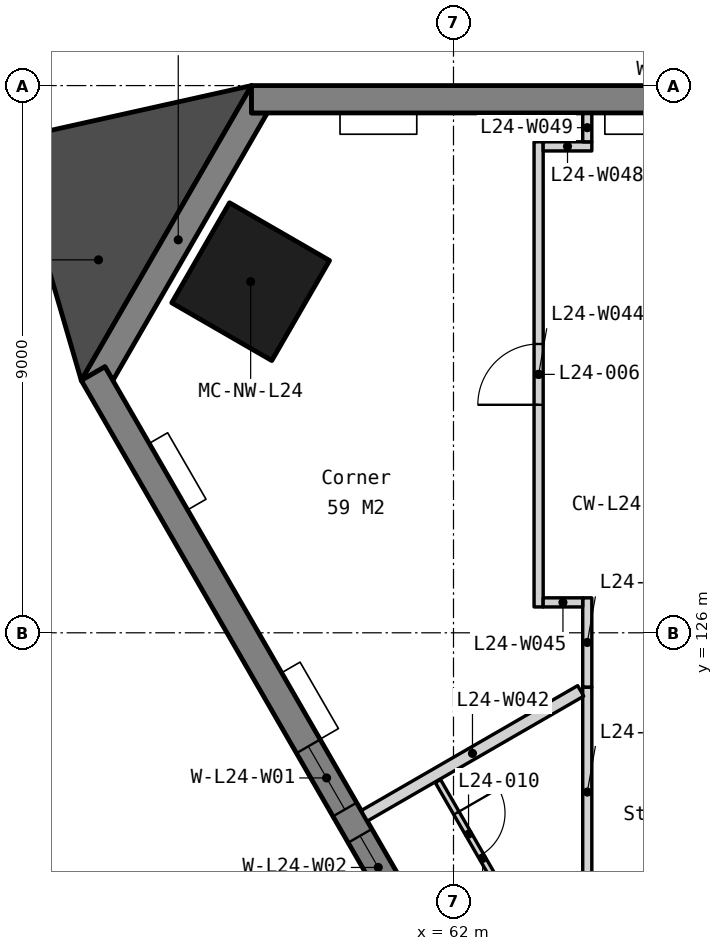
"""IFC4 building model, lengths in metres.
Left out: names, types, materials, properties, quantities, classifications, styles, units other than length and angle.
Written with IfcOpenShell. Run it as: python <this file> out.ifc"""

import sys

from ifc_helpers import new_model, si_unit, direction, frame, frame_2d, origin, origin_2d, place, context, subcontext, project, spatial, polyline, rectangle, outline, extrude, element, fill, save


model = new_model("IFC4")
c1 = context("Model", 3, precision=1e-05, world=origin(), true_north=direction((0.0, 1.0)))
c2 = subcontext(c1, "Body", "Model", "MODEL_VIEW")
j1 = project(units=[si_unit("LENGTHUNIT", "METRE"), si_unit("PLANEANGLEUNIT", "RADIAN")], contexts=[c1])
p1 = place(None, origin())
s1 = spatial("IfcSite", under=j1, at=p1, CompositionType="ELEMENT")
p2 = place(p1, origin())
s2 = spatial("IfcBuilding", under=s1, at=p2, CompositionType="ELEMENT")
p3 = place(p2, frame((0.0, 0.0, 99.3)))
s3 = spatial("IfcBuildingStorey", under=s2, at=p3, CompositionType="ELEMENT", Elevation=99.3)
p4 = place(p3, frame((58.664, 131.775, 0.0), z_axis=(0.0, 0.0, 1.0), x_axis=(-0.5, -0.866025403784, 0.0)))
e1 = element("IfcColumn", 1, at=p4, inside=s3, PredefinedType="COLUMN", context=c2, shape_type="SweptSolid", body=[
    extrude(rectangle(XDim=1.9, YDim=1.9, at=origin_2d()), origin(), (0.0, 0.0, 1.0), 3.5),
])
p5 = place(p3, frame((0.0, 0.0, -0.15)))
e2 = element("IfcWall", 2, at=p5, inside=s3, PredefinedType="SOLIDWALL", context=c2, shape_type="SweptSolid", body=[
    extrude(outline(polyline([(58.678, 135.0), (58.678, 134.55), (58.938, 134.55), (56.398, 130.15), (56.268, 130.375), (55.878, 130.15), (58.678, 135.0)])), origin(), (0.0, 0.0, 1.0), 3.5),
])
p6 = place(p3, frame((101.322, 134.775, -0.15), z_axis=(0.0, 0.0, 1.0), x_axis=(-1.0, 0.0, 0.0)))
e3 = element("IfcWall", 3, at=p6, inside=s3, PredefinedType="SOLIDWALL", context=c2, shape_type="SweptSolid", body=[
    extrude(outline(polyline([(42.643, 0.0), (42.643, 3.5), (0.0, 3.5), (0.0, 0.0), (42.643, 0.0)])), frame((0.0, 0.225, 0.0), z_axis=(0.0, -1.0, 0.0), x_axis=(1.0, 0.0, 0.0)), (0.0, 0.0, 1.0), 0.45),
])
p7 = place(p6, frame((7.079, 0.0, 1.05)))
e4 = element("IfcOpeningElement", 4, at=p7, cuts=e3, PredefinedType="OPENING", context=c2, shape_type="SweptSolid", body=[
    extrude(rectangle(XDim=1.2, YDim=1.5, at=frame_2d((0.6, 0.75))), frame((0.0, 0.235, 0.0), z_axis=(0.0, -1.0, 0.0), x_axis=(1.0, 0.0, 0.0)), (0.0, 0.0, 1.0), 0.47),
])
p8 = place(p6, frame((8.779, 0.0, 1.05)))
e5 = element("IfcOpeningElement", 5, at=p8, cuts=e3, PredefinedType="OPENING", context=c2, shape_type="SweptSolid", body=[
    extrude(rectangle(XDim=1.2, YDim=1.5, at=frame_2d((0.6, 0.75))), frame((0.0, 0.235, 0.0), z_axis=(0.0, -1.0, 0.0), x_axis=(1.0, 0.0, 0.0)), (0.0, 0.0, 1.0), 0.47),
])
p9 = place(p6, frame((15.607, 0.0, 1.05)))
e6 = element("IfcOpeningElement", 6, at=p9, cuts=e3, PredefinedType="OPENING", context=c2, shape_type="SweptSolid", body=[
    extrude(rectangle(XDim=1.2, YDim=1.5, at=frame_2d((0.6, 0.75))), frame((0.0, 0.235, 0.0), z_axis=(0.0, -1.0, 0.0), x_axis=(1.0, 0.0, 0.0)), (0.0, 0.0, 1.0), 0.47),
])
p10 = place(p6, frame((17.307, 0.0, 1.05)))
e7 = element("IfcOpeningElement", 7, at=p10, cuts=e3, PredefinedType="OPENING", context=c2, shape_type="SweptSolid", body=[
    extrude(rectangle(XDim=1.2, YDim=1.5, at=frame_2d((0.6, 0.75))), frame((0.0, 0.235, 0.0), z_axis=(0.0, -1.0, 0.0), x_axis=(1.0, 0.0, 0.0)), (0.0, 0.0, 1.0), 0.47),
])
p11 = place(p6, frame((24.136, 0.0, 1.05)))
e8 = element("IfcOpeningElement", 8, at=p11, cuts=e3, PredefinedType="OPENING", context=c2, shape_type="SweptSolid", body=[
    extrude(rectangle(XDim=1.2, YDim=1.5, at=frame_2d((0.6, 0.75))), frame((0.0, 0.235, 0.0), z_axis=(0.0, -1.0, 0.0), x_axis=(1.0, 0.0, 0.0)), (0.0, 0.0, 1.0), 0.47),
])
p12 = place(p6, frame((25.836, 0.0, 1.05)))
e9 = element("IfcOpeningElement", 9, at=p12, cuts=e3, PredefinedType="OPENING", context=c2, shape_type="SweptSolid", body=[
    extrude(rectangle(XDim=1.2, YDim=1.5, at=frame_2d((0.6, 0.75))), frame((0.0, 0.235, 0.0), z_axis=(0.0, -1.0, 0.0), x_axis=(1.0, 0.0, 0.0)), (0.0, 0.0, 1.0), 0.47),
])
p13 = place(p6, frame((32.665, 0.0, 1.05)))
e10 = element("IfcOpeningElement", 10, at=p13, cuts=e3, PredefinedType="OPENING", context=c2, shape_type="SweptSolid", body=[
    extrude(rectangle(XDim=1.2, YDim=1.5, at=frame_2d((0.6, 0.75))), frame((0.0, 0.235, 0.0), z_axis=(0.0, -1.0, 0.0), x_axis=(1.0, 0.0, 0.0)), (0.0, 0.0, 1.0), 0.47),
])
p14 = place(p6, frame((34.365, 0.0, 1.05)))
e11 = element("IfcOpeningElement", 11, at=p14, cuts=e3, PredefinedType="OPENING", context=c2, shape_type="SweptSolid", body=[
    extrude(rectangle(XDim=1.2, YDim=1.5, at=frame_2d((0.6, 0.75))), frame((0.0, 0.235, 0.0), z_axis=(0.0, -1.0, 0.0), x_axis=(1.0, 0.0, 0.0)), (0.0, 0.0, 1.0), 0.47),
])
p15 = place(p3, frame((56.073, 130.263, -0.15), z_axis=(0.0, 0.0, 1.0), x_axis=(0.500002343971, -0.866024050488, 0.0)))
e12 = element("IfcWall", 12, at=p15, inside=s3, PredefinedType="SOLIDWALL", context=c2, shape_type="SweptSolid", body=[
    extrude(outline(polyline([(0.0, 0.0), (0.0, 3.5), (23.986, 3.5), (23.986, 0.0), (0.0, 0.0)])), frame((0.0, 0.225, 0.0), z_axis=(0.0, -1.0, 0.0), x_axis=(1.0, 0.0, 0.0)), (0.0, 0.0, 1.0), 0.45),
])
p16 = place(p15, frame((7.079, 0.0, 1.05)))
e13 = element("IfcOpeningElement", 13, at=p16, cuts=e12, PredefinedType="OPENING", context=c2, shape_type="SweptSolid", body=[
    extrude(rectangle(XDim=1.2, YDim=1.5, at=frame_2d((0.6, 0.75))), frame((0.0, 0.235, 0.0), z_axis=(0.0, -1.0, 0.0), x_axis=(1.0, 0.0, 0.0)), (0.0, 0.0, 1.0), 0.47),
])
p17 = place(p15, frame((8.779, 0.0, 1.05)))
e14 = element("IfcOpeningElement", 14, at=p17, cuts=e12, PredefinedType="OPENING", context=c2, shape_type="SweptSolid", body=[
    extrude(rectangle(XDim=1.2, YDim=1.5, at=frame_2d((0.6, 0.75))), frame((0.0, 0.235, 0.0), z_axis=(0.0, -1.0, 0.0), x_axis=(1.0, 0.0, 0.0)), (0.0, 0.0, 1.0), 0.47),
])
p18 = place(p15, frame((15.607, 0.0, 1.05)))
e15 = element("IfcOpeningElement", 15, at=p18, cuts=e12, PredefinedType="OPENING", context=c2, shape_type="SweptSolid", body=[
    extrude(rectangle(XDim=1.2, YDim=1.5, at=frame_2d((0.6, 0.75))), frame((0.0, 0.235, 0.0), z_axis=(0.0, -1.0, 0.0), x_axis=(1.0, 0.0, 0.0)), (0.0, 0.0, 1.0), 0.47),
])
p19 = place(p15, frame((17.307, 0.0, 1.05)))
e16 = element("IfcOpeningElement", 16, at=p19, cuts=e12, PredefinedType="OPENING", context=c2, shape_type="SweptSolid", body=[
    extrude(rectangle(XDim=1.2, YDim=1.5, at=frame_2d((0.6, 0.75))), frame((0.0, 0.235, 0.0), z_axis=(0.0, -1.0, 0.0), x_axis=(1.0, 0.0, 0.0)), (0.0, 0.0, 1.0), 0.47),
])
p20 = place(p3, frame((0.0, 0.0, -0.15)))
e17 = element("IfcWall", 17, at=p20, inside=s3, PredefinedType="SOLIDWALL", context=c2, shape_type="SweptSolid", body=[
    extrude(outline(polyline([(58.678, 135.0), (54.721, 134.117), (55.878, 130.15), (58.678, 135.0)])), origin(), (0.0, 0.0, 1.0), 3.5),
])
p21 = place(p3, frame((61.743, 123.562, 0.0), z_axis=(0.0, 0.0, 1.0), x_axis=(0.500050696077, -0.865996132412, 0.0)))
e18 = element("IfcWall", 18, at=p21, inside=s3, PredefinedType="PARTITIONING", context=c2, shape_type="SweptSolid", body=[
    extrude(rectangle(XDim=2.94, YDim=0.1, at=frame_2d((1.47, 0.0))), origin(), (0.0, 0.0, 1.0), 3.35),
])
p22 = place(p21, frame((0.608, 0.0, 0.0)))
e19 = element("IfcOpeningElement", 19, at=p22, cuts=e18, PredefinedType="OPENING", context=c2, shape_type="SweptSolid", body=[
    extrude(rectangle(XDim=0.8, YDim=2.1, at=frame_2d((0.4, 1.05))), frame((0.0, 0.06, 0.0), z_axis=(0.0, -1.0, 0.0), x_axis=(1.0, 0.0, 0.0)), (0.0, 0.0, 1.0), 0.12),
])
p23 = place(p3, frame((64.2, 121.654, 0.0), z_axis=(0.0, 0.0, 1.0), x_axis=(0.0, 1.0, 0.0)))
e20 = element("IfcWall", 20, at=p23, inside=s3, PredefinedType="PARTITIONING", context=c2, shape_type="SweptSolid", body=[
    extrude(rectangle(XDim=3.453, YDim=0.15, at=frame_2d((1.726, 0.0))), origin(), (0.0, 0.0, 1.0), 3.35),
])
p24 = place(p3, frame((60.532, 122.989, 0.0), z_axis=(0.0, 0.0, 1.0), x_axis=(0.866030279993, 0.499991554064, 0.0)))
e21 = element("IfcWall", 21, at=p24, inside=s3, PredefinedType="PARTITIONING", context=c2, shape_type="SweptSolid", body=[
    extrude(rectangle(XDim=4.11, YDim=0.2, at=frame_2d((2.055, 0.0))), origin(), (0.0, 0.0, 1.0), 3.35),
])
p25 = place(p3, frame((64.2, 125.107, 0.0), z_axis=(0.0, 0.0, 1.0), x_axis=(0.0, 1.0, 0.0)))
e22 = element("IfcWall", 22, at=p25, inside=s3, PredefinedType="PARTITIONING", context=c2, shape_type="SweptSolid", body=[
    extrude(rectangle(XDim=1.468, YDim=0.15, at=frame_2d((0.734, 0.0))), origin(), (0.0, 0.0, 1.0), 3.35),
])
p26 = place(p3, frame((63.4, 126.425, 0.0), z_axis=(0.0, 0.0, 1.0), x_axis=(0.0, 1.0, 0.0)))
e23 = element("IfcWall", 23, at=p26, inside=s3, PredefinedType="PARTITIONING", context=c2, shape_type="SweptSolid", body=[
    extrude(rectangle(XDim=7.65, YDim=0.15, at=frame_2d((3.825, 0.0))), origin(), (0.0, 0.0, 1.0), 3.35),
])
p27 = place(p26, frame((3.325, 0.0, 0.0)))
e24 = element("IfcOpeningElement", 24, at=p27, cuts=e23, PredefinedType="OPENING", context=c2, shape_type="SweptSolid", body=[
    extrude(rectangle(XDim=1.0, YDim=2.1, at=frame_2d((0.5, 1.05))), frame((0.0, 0.085, 0.0), z_axis=(0.0, -1.0, 0.0), x_axis=(1.0, 0.0, 0.0)), (0.0, 0.0, 1.0), 0.17),
])
p28 = place(p3, frame((63.475, 126.5, 0.0), z_axis=(0.0, 0.0, 1.0), x_axis=(1.0, 0.0, 0.0)))
e25 = element("IfcWall", 25, at=p28, inside=s3, PredefinedType="PARTITIONING", context=c2, shape_type="SweptSolid", body=[
    extrude(rectangle(XDim=0.65, YDim=0.15, at=frame_2d((0.325, 0.0))), origin(), (0.0, 0.0, 1.0), 3.35),
])
p29 = place(p3, frame((63.475, 134.0, 0.0), z_axis=(0.0, 0.0, 1.0), x_axis=(1.0, 0.0, 0.0)))
e26 = element("IfcWall", 26, at=p29, inside=s3, PredefinedType="PARTITIONING", context=c2, shape_type="SweptSolid", body=[
    extrude(rectangle(XDim=0.8, YDim=0.15, at=frame_2d((0.4, 0.0))), origin(), (0.0, 0.0, 1.0), 2.886),
])
p30 = place(p3, frame((64.2, 134.075, 0.0), z_axis=(0.0, 0.0, 1.0), x_axis=(0.0, 1.0, 0.0)))
e27 = element("IfcWall", 27, at=p30, inside=s3, PredefinedType="PARTITIONING", context=c2, shape_type="SweptSolid", body=[
    extrude(rectangle(XDim=0.465, YDim=0.15, at=frame_2d((0.232, 0.0))), origin(), (0.0, 0.0, 1.0), 3.35),
])
p31 = place(p16, origin())
e28 = element("IfcWindow", 28, at=p31, inside=s3, PartitioningType="SINGLE_PANEL", PredefinedType="WINDOW", context=c2, shape_type="SweptSolid", body=[
    extrude(rectangle(XDim=1.2, YDim=1.5, at=frame_2d((0.6, 0.75))), frame((0.0, 0.03, 0.0), z_axis=(0.0, -1.0, 0.0), x_axis=(1.0, 0.0, 0.0)), (0.0, 0.0, 1.0), 0.06),
])
fill(e13, e28)
p32 = place(p17, origin())
e29 = element("IfcWindow", 29, at=p32, inside=s3, PartitioningType="SINGLE_PANEL", PredefinedType="WINDOW", context=c2, shape_type="SweptSolid", body=[
    extrude(rectangle(XDim=1.2, YDim=1.5, at=frame_2d((0.6, 0.75))), frame((0.0, 0.03, 0.0), z_axis=(0.0, -1.0, 0.0), x_axis=(1.0, 0.0, 0.0)), (0.0, 0.0, 1.0), 0.06),
])
fill(e14, e29)
p33 = place(p27, origin())
e30 = element("IfcDoor", 30, at=p33, inside=s3, OperationType="SINGLE_SWING_LEFT", PredefinedType="DOOR", context=c2, shape_type="SweptSolid", body=[
    extrude(rectangle(XDim=1.0, YDim=2.1, at=frame_2d((0.5, 1.05))), frame((0.0, 0.025, 0.0), z_axis=(0.0, -1.0, 0.0), x_axis=(1.0, 0.0, 0.0)), (0.0, 0.0, 1.0), 0.05),
])
fill(e24, e30)
p34 = place(p22, origin())
e31 = element("IfcDoor", 31, at=p34, inside=s3, OperationType="SINGLE_SWING_LEFT", PredefinedType="DOOR", context=c2, shape_type="SweptSolid", body=[
    extrude(rectangle(XDim=0.8, YDim=2.1, at=frame_2d((0.4, 1.05))), frame((0.0, 0.025, 0.0), z_axis=(0.0, -1.0, 0.0), x_axis=(1.0, 0.0, 0.0)), (0.0, 0.0, 1.0), 0.05),
])
fill(e19, e31)
save(model, sys.argv[1])
